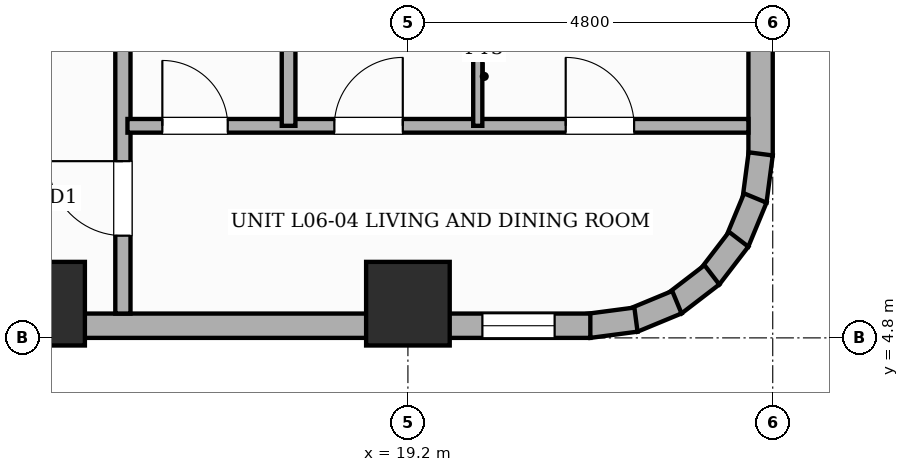
"""IFC4 building model, lengths in metres.
Left out: names, types, materials, properties, quantities, classifications, styles, units other than length and angle.
Written with IfcOpenShell. Run it as: python <this file> out.ifc"""

import sys

from ifc_helpers import new_model, si_unit, direction, frame, frame_2d, origin, origin_2d, place, context, subcontext, project, spatial, rectangle, extrude, element, fill, save


model = new_model("IFC4")
c1 = context("Model", 3, precision=1e-05, world=origin(), true_north=direction((0.0, 1.0)))
c2 = subcontext(c1, "Body", "Model", "MODEL_VIEW")
j1 = project(units=[si_unit("LENGTHUNIT", "METRE"), si_unit("PLANEANGLEUNIT", "RADIAN")], contexts=[c1])
p1 = place(None, origin())
s1 = spatial("IfcSite", under=j1, at=p1, CompositionType="ELEMENT")
p2 = place(p1, origin())
s2 = spatial("IfcBuilding", under=s1, at=p2, CompositionType="ELEMENT")
p3 = place(p2, frame((0.0, 0.0, 28.6)))
s3 = spatial("IfcBuildingStorey", under=s2, at=p3, CompositionType="ELEMENT", Elevation=28.6)
for number, where, z_axis, x_axis in (
    (1, (14.4, 5.25, 0.0), (0.0, 0.0, 1.0), (1.0, 0.0, 0.0)),
    (2, (19.2, 5.25, 0.0), (0.0, 0.0, 1.0), (1.0, 0.0, 0.0)),
):
    element("IfcColumn", number, at=place(p3, frame(where, z_axis=z_axis, x_axis=x_axis)), inside=s3, PredefinedType="COLUMN", context=c2, shape_type="SweptSolid", body=[
        extrude(rectangle(XDim=1.1, YDim=1.1, at=origin_2d()), origin(), (0.0, 0.0, 1.0), 3.6),
    ])
p4 = place(p3, frame((23.84, 26.4, 0.0), z_axis=(0.0, 0.0, 1.0), x_axis=(0.0, -1.0, 0.0)))
e3 = element("IfcWall", 3, at=p4, inside=s3, PredefinedType="STANDARD", context=c2, shape_type="SweptSolid", body=[
    extrude(rectangle(XDim=19.2, YDim=0.32, at=frame_2d((9.6, 0.0))), origin(), (0.0, 0.0, 1.0), 2.53),
])
p5 = place(p4, frame((15.04, 0.0, 0.45)))
e4 = element("IfcOpeningElement", 4, at=p5, cuts=e3, PredefinedType="OPENING", context=c2, shape_type="SweptSolid", body=[
    extrude(rectangle(XDim=0.95, YDim=1.8, at=frame_2d((0.475, 0.9))), frame((0.0, 0.17, 0.0), z_axis=(0.0, -1.0, 0.0), x_axis=(1.0, 0.0, 0.0)), (0.0, 0.0, 1.0), 0.34),
])
p6 = place(p4, frame((8.22, 0.0, 0.65)))
e5 = element("IfcOpeningElement", 5, at=p6, cuts=e3, PredefinedType="OPENING", context=c2, shape_type="SweptSolid", body=[
    extrude(rectangle(XDim=1.4, YDim=1.1, at=frame_2d((0.7, 0.55))), frame((0.0, 0.17, 0.0), z_axis=(0.0, -1.0, 0.0), x_axis=(1.0, 0.0, 0.0)), (0.0, 0.0, 1.0), 0.34),
])
p7 = place(p4, frame((4.795, 0.0, 0.65)))
e6 = element("IfcOpeningElement", 6, at=p7, cuts=e3, PredefinedType="OPENING", context=c2, shape_type="SweptSolid", body=[
    extrude(rectangle(XDim=1.4, YDim=1.1, at=frame_2d((0.7, 0.55))), frame((0.0, 0.17, 0.0), z_axis=(0.0, -1.0, 0.0), x_axis=(1.0, 0.0, 0.0)), (0.0, 0.0, 1.0), 0.34),
])
p8 = place(p4, frame((10.26, 0.0, 0.45)))
e7 = element("IfcOpeningElement", 7, at=p8, cuts=e3, PredefinedType="OPENING", context=c2, shape_type="SweptSolid", body=[
    extrude(rectangle(XDim=0.95, YDim=1.8, at=frame_2d((0.475, 0.9))), frame((0.0, 0.17, 0.0), z_axis=(0.0, -1.0, 0.0), x_axis=(1.0, 0.0, 0.0)), (0.0, 0.0, 1.0), 0.34),
])
p9 = place(p4, frame((0.88, 0.0, 0.45)))
e8 = element("IfcOpeningElement", 8, at=p9, cuts=e3, PredefinedType="OPENING", context=c2, shape_type="SweptSolid", body=[
    extrude(rectangle(XDim=0.75, YDim=1.8, at=frame_2d((0.375, 0.9))), frame((0.0, 0.17, 0.0), z_axis=(0.0, -1.0, 0.0), x_axis=(1.0, 0.0, 0.0)), (0.0, 0.0, 1.0), 0.34),
])
p10 = place(p3, frame((23.841, 7.221, 0.0), z_axis=(0.0, 0.0, 1.0), x_axis=(-0.130504898859, -0.991447664465, 0.0)))
e9 = element("IfcWall", 9, at=p10, inside=s3, PredefinedType="STANDARD", context=c2, shape_type="SweptSolid", body=[
    extrude(rectangle(XDim=0.627, YDim=0.32, at=frame_2d((0.313, 0.0))), origin(), (0.0, 0.0, 1.0), 3.35),
])
p11 = place(p3, frame((23.771, 6.64, 0.0), z_axis=(0.0, 0.0, 1.0), x_axis=(-0.382787856107, -0.923836271867, 0.0)))
e10 = element("IfcWall", 10, at=p11, inside=s3, PredefinedType="STANDARD", context=c2, shape_type="SweptSolid", body=[
    extrude(rectangle(XDim=0.626, YDim=0.32, at=frame_2d((0.313, 0.0))), origin(), (0.0, 0.0, 1.0), 3.35),
])
p12 = place(p3, frame((23.552, 6.097, 0.0), z_axis=(0.0, 0.0, 1.0), x_axis=(-0.608693302629, -0.793405610854, 0.0)))
e11 = element("IfcWall", 11, at=p12, inside=s3, PredefinedType="STANDARD", context=c2, shape_type="SweptSolid", body=[
    extrude(rectangle(XDim=0.626, YDim=0.32, at=frame_2d((0.313, 0.0))), origin(), (0.0, 0.0, 1.0), 3.35),
])
p13 = place(p3, frame((23.2, 5.63, 0.0), z_axis=(0.0, 0.0, 1.0), x_axis=(-0.7932174212, -0.608938521285, 0.0)))
e12 = element("IfcWall", 12, at=p13, inside=s3, PredefinedType="STANDARD", context=c2, shape_type="SweptSolid", body=[
    extrude(rectangle(XDim=0.627, YDim=0.32, at=frame_2d((0.313, 0.0))), origin(), (0.0, 0.0, 1.0), 3.35),
])
for number, where, z_axis, x_axis in (
    (13, (22.739, 5.269, 0.0), (0.0, 0.0, 1.0), (-0.924, -0.383, 0.0)),
    (14, (22.2, 5.04, 0.0), (0.0, 0.0, 1.0), (-0.991, -0.131, 0.0)),
):
    element("IfcWall", number, at=place(p3, frame(where, z_axis=z_axis, x_axis=x_axis)), inside=s3, PredefinedType="STANDARD", context=c2, shape_type="SweptSolid", body=[
        extrude(rectangle(XDim=0.626, YDim=0.32, at=frame_2d((0.313, 0.0))), origin(), (0.0, 0.0, 1.0), 3.35),
    ])
p14 = place(p3, frame((21.6, 4.96, 0.0), z_axis=(0.0, 0.0, 1.0), x_axis=(-1.0, 0.0, 0.0)))
e15 = element("IfcWall", 15, at=p14, inside=s3, PredefinedType="STANDARD", context=c2, shape_type="SweptSolid", body=[
    extrude(rectangle(XDim=14.4, YDim=0.32, at=frame_2d((7.2, 0.0))), origin(), (0.0, 0.0, 1.0), 2.53),
])
p15 = place(p14, frame((9.015, 0.0, 0.65)))
e16 = element("IfcOpeningElement", 16, at=p15, cuts=e15, PredefinedType="OPENING", context=c2, shape_type="SweptSolid", body=[
    extrude(rectangle(XDim=1.4, YDim=1.1, at=frame_2d((0.7, 0.55))), frame((0.0, 0.17, 0.0), z_axis=(0.0, -1.0, 0.0), x_axis=(1.0, 0.0, 0.0)), (0.0, 0.0, 1.0), 0.34),
])
p16 = place(p14, frame((0.47, 0.0, 0.45)))
e17 = element("IfcOpeningElement", 17, at=p16, cuts=e15, PredefinedType="OPENING", context=c2, shape_type="SweptSolid", body=[
    extrude(rectangle(XDim=0.95, YDim=1.8, at=frame_2d((0.475, 0.9))), frame((0.0, 0.17, 0.0), z_axis=(0.0, -1.0, 0.0), x_axis=(1.0, 0.0, 0.0)), (0.0, 0.0, 1.0), 0.34),
])
p17 = place(p3, frame((15.45, 5.12, 0.0), z_axis=(0.0, 0.0, 1.0), x_axis=(0.0, 1.0, 0.0)))
e18 = element("IfcWall", 18, at=p17, inside=s3, PredefinedType="PARTITIONING", context=c2, shape_type="SweptSolid", body=[
    extrude(rectangle(XDim=20.63, YDim=0.2, at=frame_2d((10.315, 0.0))), origin(), (0.0, 0.0, 1.0), 3.35),
])
p18 = place(p17, frame((1.025, 0.0, 0.0)))
e19 = element("IfcOpeningElement", 19, at=p18, cuts=e18, PredefinedType="OPENING", context=c2, shape_type="SweptSolid", body=[
    extrude(rectangle(XDim=0.98, YDim=2.18, at=frame_2d((0.49, 1.09))), frame((0.0, 0.11, 0.0), z_axis=(0.0, -1.0, 0.0), x_axis=(1.0, 0.0, 0.0)), (0.0, 0.0, 1.0), 0.22),
])
p19 = place(p17, frame((8.39, 0.0, 0.0)))
e20 = element("IfcOpeningElement", 20, at=p19, cuts=e18, PredefinedType="OPENING", context=c2, shape_type="SweptSolid", body=[
    extrude(rectangle(XDim=0.98, YDim=2.18, at=frame_2d((0.49, 1.09))), frame((0.0, 0.11, 0.0), z_axis=(0.0, -1.0, 0.0), x_axis=(1.0, 0.0, 0.0)), (0.0, 0.0, 1.0), 0.22),
])
p20 = place(p17, frame((14.71, 0.0, 0.0)))
e21 = element("IfcOpeningElement", 21, at=p20, cuts=e18, PredefinedType="OPENING", context=c2, shape_type="SweptSolid", body=[
    extrude(rectangle(XDim=0.98, YDim=2.18, at=frame_2d((0.49, 1.09))), frame((0.0, 0.11, 0.0), z_axis=(0.0, -1.0, 0.0), x_axis=(1.0, 0.0, 0.0)), (0.0, 0.0, 1.0), 0.22),
])
p21 = place(p3, frame((15.51, 7.59, 0.0), z_axis=(0.0, 0.0, 1.0), x_axis=(1.0, 0.0, 0.0)))
e22 = element("IfcWall", 22, at=p21, inside=s3, PredefinedType="PLUMBINGWALL", context=c2, shape_type="SweptSolid", body=[
    extrude(rectangle(XDim=8.17, YDim=0.18, at=frame_2d((4.085, 0.0))), origin(), (0.0, 0.0, 1.0), 3.35),
])
p22 = place(p21, frame((0.459, 0.0, 0.0)))
e23 = element("IfcOpeningElement", 23, at=p22, cuts=e22, PredefinedType="OPENING", context=c2, shape_type="SweptSolid", body=[
    extrude(rectangle(XDim=0.86, YDim=2.1, at=frame_2d((0.43, 1.05))), frame((0.0, 0.1, 0.0), z_axis=(0.0, -1.0, 0.0), x_axis=(1.0, 0.0, 0.0)), (0.0, 0.0, 1.0), 0.2),
])
p23 = place(p21, frame((2.722, 0.0, 0.0)))
e24 = element("IfcOpeningElement", 24, at=p23, cuts=e22, PredefinedType="OPENING", context=c2, shape_type="SweptSolid", body=[
    extrude(rectangle(XDim=0.9, YDim=2.15, at=frame_2d((0.45, 1.075))), frame((0.0, 0.1, 0.0), z_axis=(0.0, -1.0, 0.0), x_axis=(1.0, 0.0, 0.0)), (0.0, 0.0, 1.0), 0.2),
])
p24 = place(p21, frame((5.766, 0.0, 0.0)))
e25 = element("IfcOpeningElement", 25, at=p24, cuts=e22, PredefinedType="OPENING", context=c2, shape_type="SweptSolid", body=[
    extrude(rectangle(XDim=0.9, YDim=2.15, at=frame_2d((0.45, 1.075))), frame((0.0, 0.1, 0.0), z_axis=(0.0, -1.0, 0.0), x_axis=(1.0, 0.0, 0.0)), (0.0, 0.0, 1.0), 0.2),
])
p25 = place(p3, frame((17.63, 7.59, 0.0), z_axis=(0.0, 0.0, 1.0), x_axis=(0.0, 1.0, 0.0)))
e26 = element("IfcWall", 26, at=p25, inside=s3, PredefinedType="PLUMBINGWALL", context=c2, shape_type="SweptSolid", body=[
    extrude(rectangle(XDim=4.05, YDim=0.18, at=frame_2d((2.025, 0.0))), origin(), (0.0, 0.0, 1.0), 3.35),
])
p26 = place(p3, frame((20.119, 7.59, 0.0), z_axis=(0.0, 0.0, 1.0), x_axis=(0.0, 1.0, 0.0)))
e27 = element("IfcWall", 27, at=p26, inside=s3, PredefinedType="PARTITIONING", context=c2, shape_type="SweptSolid", body=[
    extrude(rectangle(XDim=4.05, YDim=0.12, at=frame_2d((2.025, 0.0))), origin(), (0.0, 0.0, 1.0), 3.35),
])
p27 = place(p16, origin())
e28 = element("IfcWindow", 28, at=p27, inside=s3, PartitioningType="SINGLE_PANEL", PredefinedType="WINDOW", context=c2, shape_type="SweptSolid", body=[
    extrude(rectangle(XDim=0.95, YDim=1.8, at=frame_2d((0.475, 0.9))), frame((0.0, 0.03, 0.0), z_axis=(0.0, -1.0, 0.0), x_axis=(1.0, 0.0, 0.0)), (0.0, 0.0, 1.0), 0.06),
])
fill(e17, e28)
p28 = place(p18, origin())
e29 = element("IfcDoor", 29, at=p28, inside=s3, OperationType="SINGLE_SWING_RIGHT", PredefinedType="DOOR", context=c2, shape_type="SweptSolid", body=[
    extrude(rectangle(XDim=0.98, YDim=2.18, at=frame_2d((0.49, 1.09))), frame((0.0, 0.025, 0.0), z_axis=(0.0, -1.0, 0.0), x_axis=(1.0, 0.0, 0.0)), (0.0, 0.0, 1.0), 0.05),
])
fill(e19, e29)
p29 = place(p22, origin())
e30 = element("IfcDoor", 30, at=p29, inside=s3, OperationType="SINGLE_SWING_LEFT", PredefinedType="DOOR", context=c2, shape_type="SweptSolid", body=[
    extrude(rectangle(XDim=0.86, YDim=2.1, at=frame_2d((0.43, 1.05))), frame((0.0, 0.025, 0.0), z_axis=(0.0, -1.0, 0.0), x_axis=(1.0, 0.0, 0.0)), (0.0, 0.0, 1.0), 0.05),
])
fill(e23, e30)
p30 = place(p23, origin())
e31 = element("IfcDoor", 31, at=p30, inside=s3, OperationType="SINGLE_SWING_RIGHT", PredefinedType="DOOR", context=c2, shape_type="SweptSolid", body=[
    extrude(rectangle(XDim=0.9, YDim=2.15, at=frame_2d((0.45, 1.075))), frame((0.0, 0.025, 0.0), z_axis=(0.0, -1.0, 0.0), x_axis=(1.0, 0.0, 0.0)), (0.0, 0.0, 1.0), 0.05),
])
fill(e24, e31)
p31 = place(p24, origin())
e32 = element("IfcDoor", 32, at=p31, inside=s3, OperationType="SINGLE_SWING_LEFT", PredefinedType="DOOR", context=c2, shape_type="SweptSolid", body=[
    extrude(rectangle(XDim=0.9, YDim=2.15, at=frame_2d((0.45, 1.075))), frame((0.0, 0.025, 0.0), z_axis=(0.0, -1.0, 0.0), x_axis=(1.0, 0.0, 0.0)), (0.0, 0.0, 1.0), 0.05),
])
fill(e25, e32)
save(model, sys.argv[1])
